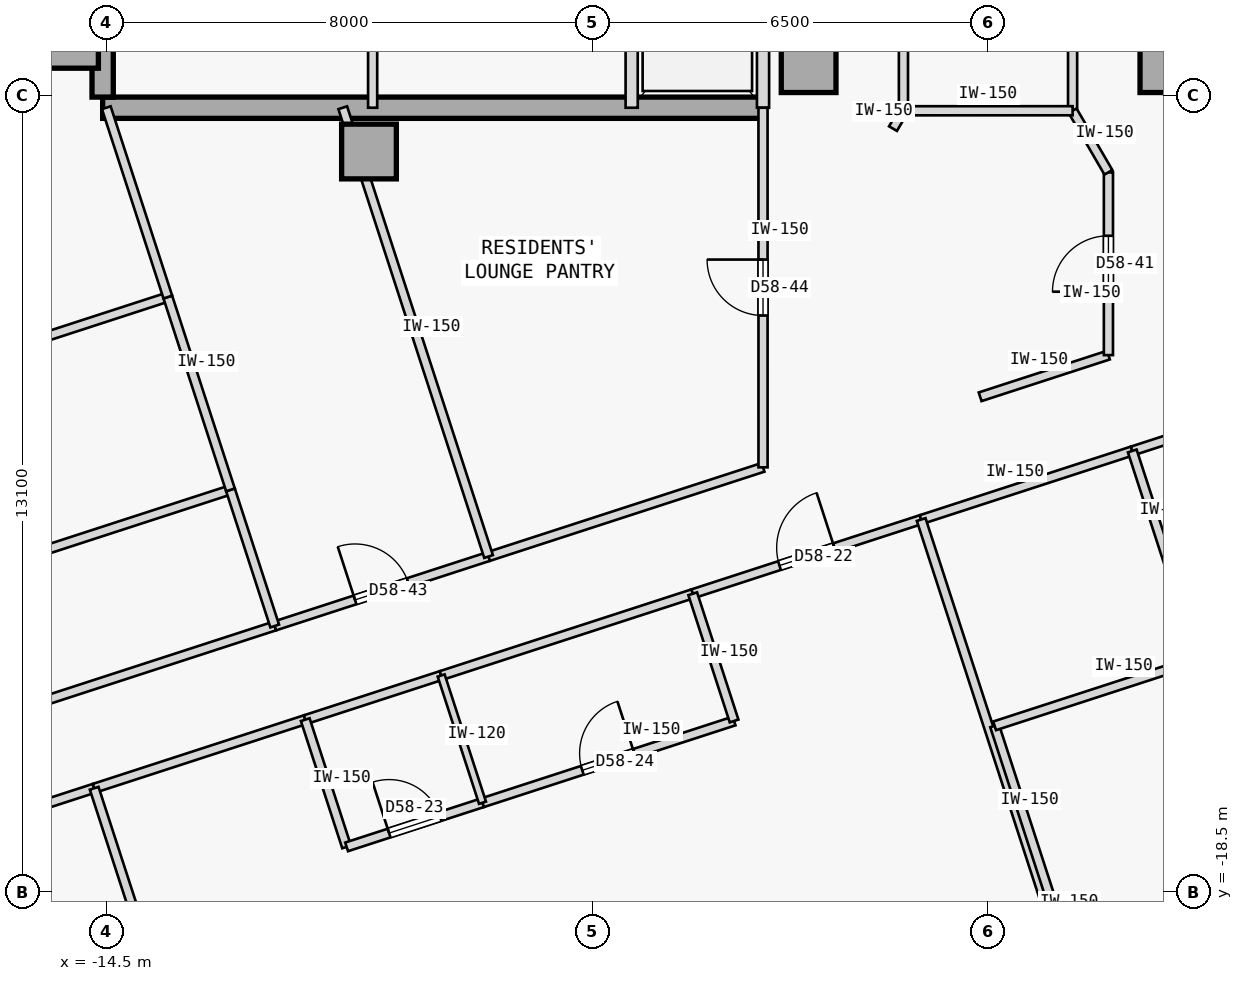
"""IFC4 building model, lengths in metres.
Left out: names, types, materials, properties, quantities, classifications, styles, units other than length and angle.
Written with IfcOpenShell. Run it as: python <this file> out.ifc"""

import sys

from ifc_helpers import new_model, si_unit, direction, frame, frame_2d, origin, origin_2d, place, context, subcontext, project, spatial, rectangle, extrude, element, fill, save


model = new_model("IFC4")
c1 = context("Model", 3, precision=1e-05, world=origin(), true_north=direction((0.0, 1.0)))
c2 = subcontext(c1, "Body", "Model", "MODEL_VIEW")
j1 = project(units=[si_unit("LENGTHUNIT", "METRE"), si_unit("PLANEANGLEUNIT", "RADIAN")], contexts=[c1])
p1 = place(None, origin())
s1 = spatial("IfcSite", under=j1, at=p1, CompositionType="ELEMENT")
p2 = place(p1, origin())
s2 = spatial("IfcBuilding", under=s1, at=p2, CompositionType="ELEMENT")
p3 = place(p2, frame((0.0, 0.0, 220.95)))
s3 = spatial("IfcBuildingStorey", under=s2, at=p3, CompositionType="ELEMENT", Elevation=220.95)
for number, where, z_axis, x_axis in (
    (1, (-15.08, -4.5, 0.0), (0.0, 0.0, 1.0), (1.0, 0.0, 0.0)),
    (2, (-10.18, -6.32, 0.0), (0.0, 0.0, 1.0), (1.0, 0.0, 0.0)),
    (3, (-2.95, -4.9, 0.0), (0.0, 0.0, 1.0), (1.0, 0.0, 0.0)),
    (4, (2.95, -4.9, 0.0), (0.0, 0.0, 1.0), (1.0, 0.0, 0.0)),
):
    element("IfcColumn", number, at=place(p3, frame(where, z_axis=z_axis, x_axis=x_axis)), inside=s3, PredefinedType="COLUMN", context=c2, shape_type="SweptSolid", body=[
        extrude(rectangle(XDim=0.9, YDim=0.9, at=origin_2d()), origin(), (0.0, 0.0, 1.0), 3.35),
    ])
p4 = place(p3, frame((-14.56, -5.6, 0.0), z_axis=(0.0, 0.0, 1.0), x_axis=(1.0, 0.0, 0.0)))
e5 = element("IfcWall", 5, at=p4, inside=s3, PredefinedType="SHEAR", context=c2, shape_type="SweptSolid", body=[
    extrude(rectangle(XDim=10.86, YDim=0.35, at=frame_2d((5.43, 0.0))), origin(), (0.0, 0.0, 1.0), 3.125),
])
p5 = place(p3, frame((-14.56, -5.425, 0.0), z_axis=(0.0, 0.0, 1.0), x_axis=(0.0, 1.0, 0.0)))
e6 = element("IfcWall", 6, at=p5, inside=s3, PredefinedType="SHEAR", context=c2, shape_type="SweptSolid", body=[
    extrude(rectangle(XDim=10.85, YDim=0.35, at=frame_2d((5.425, 0.0))), origin(), (0.0, 0.0, 1.0), 3.125),
])
for number, where, z_axis, x_axis in (
    (7, (-3.7, -5.6, 0.0), (0.0, 0.0, 1.0), (0.0, 1.0, 0.0)),
    (8, (-5.86, -5.6, 0.0), (0.0, 0.0, 1.0), (0.0, 1.0, 0.0)),
):
    element("IfcWall", number, at=place(p3, frame(where, z_axis=z_axis, x_axis=x_axis)), inside=s3, PredefinedType="STANDARD", context=c2, shape_type="SweptSolid", body=[
        extrude(rectangle(XDim=2.65, YDim=0.2, at=frame_2d((1.325, 0.0))), origin(), (0.0, 0.0, 1.0), 3.125),
    ])
p6 = place(p3, frame((-10.12, -5.6, 0.0), z_axis=(0.0, 0.0, 1.0), x_axis=(0.0, 1.0, 0.0)))
e9 = element("IfcWall", 9, at=p6, inside=s3, PredefinedType="PARTITIONING", context=c2, shape_type="SweptSolid", body=[
    extrude(rectangle(XDim=2.65, YDim=0.15, at=frame_2d((1.325, 0.0))), origin(), (0.0, 0.0, 1.0), 3.125),
])
p7 = place(p3, frame((-1.391, -5.65, 0.0), z_axis=(0.0, 0.0, 1.0), x_axis=(-8.6422954e-05, 0.999999996266, 0.0)))
e10 = element("IfcWall", 10, at=p7, inside=s3, PredefinedType="PARTITIONING", context=c2, shape_type="SweptSolid", body=[
    extrude(rectangle(XDim=11.3, YDim=0.15, at=frame_2d((5.65, 0.0))), origin(), (0.0, 0.0, 1.0), 3.125),
])
p8 = place(p7, frame((5.175, 0.0, 0.0)))
e11 = element("IfcOpeningElement", 11, at=p8, cuts=e10, PredefinedType="OPENING", context=c2, shape_type="SweptSolid", body=[
    extrude(rectangle(XDim=0.95, YDim=2.15, at=frame_2d((0.475, 1.075))), frame((0.0, 0.085, 0.0), z_axis=(0.0, -1.0, 0.0), x_axis=(1.0, 0.0, 0.0)), (0.0, 0.0, 1.0), 0.17),
])
p9 = place(p3, frame((1.391, -5.648, 0.0), z_axis=(0.0, 0.0, 1.0), x_axis=(-4.3218947e-05, 0.999999999066, 0.0)))
e12 = element("IfcWall", 12, at=p9, inside=s3, PredefinedType="PARTITIONING", context=c2, shape_type="SweptSolid", body=[
    extrude(rectangle(XDim=11.298, YDim=0.15, at=frame_2d((5.649, 0.0))), origin(), (0.0, 0.0, 1.0), 3.125),
])
p10 = place(p3, frame((-18.992, -18.186, 0.0), z_axis=(0.0, 0.0, 1.0), x_axis=(0.951067846467, 0.308982121516, 0.0)))
e13 = element("IfcWall", 13, at=p10, inside=s3, PredefinedType="PARTITIONING", context=c2, shape_type="SweptSolid", body=[
    extrude(rectangle(XDim=4.514, YDim=0.15, at=frame_2d((2.257, 0.0))), origin(), (0.0, 0.0, 1.0), 3.125),
])
p11 = place(p10, frame((1.782, 0.0, 0.0)))
e14 = element("IfcOpeningElement", 14, at=p11, cuts=e13, PredefinedType="OPENING", context=c2, shape_type="SweptSolid", body=[
    extrude(rectangle(XDim=0.95, YDim=2.15, at=frame_2d((0.475, 1.075))), frame((0.0, 0.085, 0.0), z_axis=(0.0, -1.0, 0.0), x_axis=(1.0, 0.0, 0.0)), (0.0, 0.0, 1.0), 0.17),
])
p12 = place(p3, frame((-14.699, -16.791, 0.0), z_axis=(0.0, 0.0, 1.0), x_axis=(0.951050780541, 0.309034646652, 0.0)))
e15 = element("IfcWall", 15, at=p12, inside=s3, PredefinedType="PARTITIONING", context=c2, shape_type="SweptSolid", body=[
    extrude(rectangle(XDim=3.65, YDim=0.15, at=frame_2d((1.825, 0.0))), origin(), (0.0, 0.0, 1.0), 3.125),
])
p13 = place(p3, frame((-4.856, -13.593, 0.0), z_axis=(0.0, 0.0, 1.0), x_axis=(0.951054051148, 0.309024581215, 0.0)))
e16 = element("IfcWall", 16, at=p13, inside=s3, PredefinedType="PARTITIONING", context=c2, shape_type="SweptSolid", body=[
    extrude(rectangle(XDim=3.95, YDim=0.15, at=frame_2d((1.975, 0.0))), origin(), (0.0, 0.0, 1.0), 3.125),
])
p14 = place(p13, frame((1.5, 0.0, 0.0)))
e17 = element("IfcOpeningElement", 17, at=p14, cuts=e16, PredefinedType="OPENING", context=c2, shape_type="SweptSolid", body=[
    extrude(rectangle(XDim=0.95, YDim=2.15, at=frame_2d((0.475, 1.075))), frame((0.0, 0.085, 0.0), z_axis=(0.0, -1.0, 0.0), x_axis=(1.0, 0.0, 0.0)), (0.0, 0.0, 1.0), 0.17),
])
p15 = place(p3, frame((-11.228, -15.663, 0.0), z_axis=(0.0, 0.0, 1.0), x_axis=(0.951076048914, 0.308956872689, 0.0)))
e18 = element("IfcWall", 18, at=p15, inside=s3, PredefinedType="PARTITIONING", context=c2, shape_type="SweptSolid", body=[
    extrude(rectangle(XDim=2.35, YDim=0.15, at=frame_2d((1.175, 0.0))), origin(), (0.0, 0.0, 1.0), 3.125),
])
p16 = place(p3, frame((-8.993, -14.937, 0.0), z_axis=(0.0, 0.0, 1.0), x_axis=(0.951052627573, 0.309028962374, 0.0)))
e19 = element("IfcWall", 19, at=p16, inside=s3, PredefinedType="PARTITIONING", context=c2, shape_type="SweptSolid", body=[
    extrude(rectangle(XDim=4.35, YDim=0.15, at=frame_2d((2.175, 0.0))), origin(), (0.0, 0.0, 1.0), 3.125),
])
p17 = place(p3, frame((-1.099, -12.372, 0.0), z_axis=(0.0, 0.0, 1.0), x_axis=(0.951057168147, 0.309014988174, 0.0)))
e20 = element("IfcWall", 20, at=p17, inside=s3, PredefinedType="PARTITIONING", context=c2, shape_type="SweptSolid", body=[
    extrude(rectangle(XDim=3.65, YDim=0.15, at=frame_2d((1.825, 0.0))), origin(), (0.0, 0.0, 1.0), 3.125),
])
p18 = place(p3, frame((2.372, -11.244, 0.0), z_axis=(0.0, 0.0, 1.0), x_axis=(0.951066131077, 0.308987401554, 0.0)))
e21 = element("IfcWall", 21, at=p18, inside=s3, PredefinedType="PARTITIONING", context=c2, shape_type="SweptSolid", body=[
    extrude(rectangle(XDim=2.35, YDim=0.15, at=frame_2d((1.175, 0.0))), origin(), (0.0, 0.0, 1.0), 3.125),
])
p19 = place(p3, frame((-29.45, -19.881, 0.0), z_axis=(0.0, 0.0, 1.0), x_axis=(0.95105650271, 0.309017036186, 0.0)))
e22 = element("IfcWall", 22, at=p19, inside=s3, PredefinedType="PARTITIONING", context=c2, shape_type="SweptSolid", body=[
    extrude(rectangle(XDim=18.632, YDim=0.15, at=frame_2d((9.316, 0.0))), origin(), (0.0, 0.0, 1.0), 3.125),
])
p20 = place(p19, frame((8.856, 0.0, 0.0)))
e23 = element("IfcOpeningElement", 23, at=p20, cuts=e22, PredefinedType="OPENING", context=c2, shape_type="SweptSolid", body=[
    extrude(rectangle(XDim=0.92, YDim=2.15, at=frame_2d((0.46, 1.075))), frame((0.0, 0.085, 0.0), z_axis=(0.0, -1.0, 0.0), x_axis=(1.0, 0.0, 0.0)), (0.0, 0.0, 1.0), 0.17),
])
p21 = place(p3, frame((-0.129, -10.354, 0.0), z_axis=(0.0, 0.0, 1.0), x_axis=(0.951066420845, 0.308986509643, 0.0)))
e24 = element("IfcWall", 24, at=p21, inside=s3, PredefinedType="PARTITIONING", context=c2, shape_type="SweptSolid", body=[
    extrude(rectangle(XDim=2.218, YDim=0.15, at=frame_2d((1.109, 0.0))), origin(), (0.0, 0.0, 1.0), 3.125),
])
p22 = place(p3, frame((-1.562, -5.944, 0.0), z_axis=(0.0, 0.0, 1.0), x_axis=(0.505387839696, 0.862892305845, 0.0)))
e25 = element("IfcWall", 25, at=p22, inside=s3, PredefinedType="PARTITIONING", context=c2, shape_type="SweptSolid", body=[
    extrude(rectangle(XDim=0.34, YDim=0.15, at=frame_2d((0.17, 0.0))), origin(), (0.0, 0.0, 1.0), 3.125),
])
p23 = place(p3, frame((1.98, -9.668, 0.0), z_axis=(0.0, 0.0, 1.0), x_axis=(8.1241368e-05, 0.9999999967, 0.0)))
e26 = element("IfcWall", 26, at=p23, inside=s3, PredefinedType="PARTITIONING", context=c2, shape_type="SweptSolid", body=[
    extrude(rectangle(XDim=3.005, YDim=0.15, at=frame_2d((1.502, 0.0))), origin(), (0.0, 0.0, 1.0), 3.125),
])
p24 = place(p23, frame((1.042, 0.0, 0.0)))
e27 = element("IfcOpeningElement", 27, at=p24, cuts=e26, PredefinedType="OPENING", context=c2, shape_type="SweptSolid", body=[
    extrude(rectangle(XDim=0.92, YDim=2.15, at=frame_2d((0.46, 1.075))), frame((0.0, 0.085, 0.0), z_axis=(0.0, -1.0, 0.0), x_axis=(1.0, 0.0, 0.0)), (0.0, 0.0, 1.0), 0.17),
])
p25 = place(p3, frame((1.391, -5.649, 0.0), z_axis=(0.0, 0.0, 1.0), x_axis=(0.502522642426, -0.864564048437, 0.0)))
e28 = element("IfcWall", 28, at=p25, inside=s3, PredefinedType="PARTITIONING", context=c2, shape_type="SweptSolid", body=[
    extrude(rectangle(XDim=1.171, YDim=0.15, at=frame_2d((0.586, 0.0))), origin(), (0.0, 0.0, 1.0), 3.125),
])
p26 = place(p3, frame((-11.73, -14.123, 0.0), z_axis=(0.0, 0.0, 1.0), x_axis=(0.951052502763, 0.309029346483, 0.0)))
e29 = element("IfcWall", 29, at=p26, inside=s3, PredefinedType="PARTITIONING", context=c2, shape_type="SweptSolid", body=[
    extrude(rectangle(XDim=3.698, YDim=0.15, at=frame_2d((1.849, 0.0))), origin(), (0.0, 0.0, 1.0), 3.125),
])
p27 = place(p26, frame((1.389, 0.0, 0.0)))
e30 = element("IfcOpeningElement", 30, at=p27, cuts=e29, PredefinedType="OPENING", context=c2, shape_type="SweptSolid", body=[
    extrude(rectangle(XDim=0.92, YDim=2.15, at=frame_2d((0.46, 1.075))), frame((0.0, 0.085, 0.0), z_axis=(0.0, -1.0, 0.0), x_axis=(1.0, 0.0, 0.0)), (0.0, 0.0, 1.0), 0.17),
])
p28 = place(p3, frame((-8.213, -12.98, 0.0), z_axis=(0.0, 0.0, 1.0), x_axis=(0.951058260096, 0.309011627456, 0.0)))
e31 = element("IfcWall", 31, at=p28, inside=s3, PredefinedType="PARTITIONING", context=c2, shape_type="SweptSolid", body=[
    extrude(rectangle(XDim=4.746, YDim=0.15, at=frame_2d((2.373, 0.0))), origin(), (0.0, 0.0, 1.0), 3.125),
])
p29 = place(p3, frame((-3.7, -11.514, 0.0), z_axis=(0.0, 0.0, 1.0), x_axis=(-8.2572974e-05, 0.999999996591, 0.0)))
e32 = element("IfcWall", 32, at=p29, inside=s3, PredefinedType="PARTITIONING", context=c2, shape_type="SweptSolid", body=[
    extrude(rectangle(XDim=5.913, YDim=0.15, at=frame_2d((2.957, 0.0))), origin(), (0.0, 0.0, 1.0), 3.125),
])
p30 = place(p29, frame((2.497, 0.0, 0.0)))
e33 = element("IfcOpeningElement", 33, at=p30, cuts=e32, PredefinedType="OPENING", context=c2, shape_type="SweptSolid", body=[
    extrude(rectangle(XDim=0.92, YDim=2.15, at=frame_2d((0.46, 1.075))), frame((0.0, 0.085, 0.0), z_axis=(0.0, -1.0, 0.0), x_axis=(1.0, 0.0, 0.0)), (0.0, 0.0, 1.0), 0.17),
])
p31 = place(p3, frame((-1.391, -5.65, 0.0), z_axis=(0.0, 0.0, 1.0), x_axis=(0.999999965344, 0.000263273356, 0.0)))
e34 = element("IfcWall", 34, at=p31, inside=s3, PredefinedType="PARTITIONING", context=c2, shape_type="SweptSolid", body=[
    extrude(rectangle(XDim=2.782, YDim=0.15, at=frame_2d((1.391, 0.0))), origin(), (0.0, 0.0, 1.0), 3.125),
])
p32 = place(p3, frame((-11.652, -26.17, 0.0), z_axis=(0.0, 0.0, 1.0), x_axis=(-0.308999867152, 0.951062081097, 0.0)))
e35 = element("IfcWall", 35, at=p32, inside=s3, PredefinedType="PARTITIONING", context=c2, shape_type="SweptSolid", body=[
    extrude(rectangle(XDim=9.862, YDim=0.15, at=frame_2d((4.931, 0.0))), origin(), (0.0, 0.0, 1.0), 3.125),
])
p33 = place(p3, frame((-10.548, -17.755, 0.0), z_axis=(0.0, 0.0, 1.0), x_axis=(-0.309060979314, 0.951042223598, 0.0)))
e36 = element("IfcWall", 36, at=p33, inside=s3, PredefinedType="PARTITIONING", context=c2, shape_type="SweptSolid", body=[
    extrude(rectangle(XDim=2.2, YDim=0.15, at=frame_2d((1.1, 0.0))), origin(), (0.0, 0.0, 1.0), 3.125),
])
p34 = place(p3, frame((-10.548, -17.755, 0.0), z_axis=(0.0, 0.0, 1.0), x_axis=(0.951076048914, 0.308956872689, 0.0)))
e37 = element("IfcWall", 37, at=p34, inside=s3, PredefinedType="PARTITIONING", context=c2, shape_type="SweptSolid", body=[
    extrude(rectangle(XDim=2.35, YDim=0.15, at=frame_2d((1.175, 0.0))), origin(), (0.0, 0.0, 1.0), 3.125),
])
p35 = place(p34, frame((0.735, 0.0, 0.0)))
e38 = element("IfcOpeningElement", 38, at=p35, cuts=e37, PredefinedType="OPENING", context=c2, shape_type="SweptSolid", body=[
    extrude(rectangle(XDim=0.88, YDim=2.15, at=frame_2d((0.44, 1.075))), frame((0.0, 0.085, 0.0), z_axis=(0.0, -1.0, 0.0), x_axis=(1.0, 0.0, 0.0)), (0.0, 0.0, 1.0), 0.17),
])
p36 = place(p3, frame((-8.313, -17.029, 0.0), z_axis=(0.0, 0.0, 1.0), x_axis=(0.951052627573, 0.309028962374, 0.0)))
e39 = element("IfcWall", 39, at=p36, inside=s3, PredefinedType="PARTITIONING", context=c2, shape_type="SweptSolid", body=[
    extrude(rectangle(XDim=4.35, YDim=0.15, at=frame_2d((2.175, 0.0))), origin(), (0.0, 0.0, 1.0), 3.125),
])
p37 = place(p36, frame((1.725, 0.0, 0.0)))
e40 = element("IfcOpeningElement", 40, at=p37, cuts=e39, PredefinedType="OPENING", context=c2, shape_type="SweptSolid", body=[
    extrude(rectangle(XDim=0.9, YDim=2.15, at=frame_2d((0.45, 1.075))), frame((0.0, 0.085, 0.0), z_axis=(0.0, -1.0, 0.0), x_axis=(1.0, 0.0, 0.0)), (0.0, 0.0, 1.0), 0.17),
])
p38 = place(p3, frame((-4.176, -15.685, 0.0), z_axis=(0.0, 0.0, 1.0), x_axis=(-0.309060979314, 0.951042223598, 0.0)))
e41 = element("IfcWall", 41, at=p38, inside=s3, PredefinedType="PARTITIONING", context=c2, shape_type="SweptSolid", body=[
    extrude(rectangle(XDim=2.2, YDim=0.15, at=frame_2d((1.1, 0.0))), origin(), (0.0, 0.0, 1.0), 3.125),
])
p39 = place(p3, frame((1.948, -21.751, 0.0), z_axis=(0.0, 0.0, 1.0), x_axis=(-0.308999867152, 0.951062081097, 0.0)))
e42 = element("IfcWall", 42, at=p39, inside=s3, PredefinedType="PARTITIONING", context=c2, shape_type="SweptSolid", body=[
    extrude(rectangle(XDim=9.862, YDim=0.15, at=frame_2d((4.931, 0.0))), origin(), (0.0, 0.0, 1.0), 3.125),
])
p40 = place(p3, frame((-8.313, -17.029, 0.0), z_axis=(0.0, 0.0, 1.0), x_axis=(-0.309060979314, 0.951042223598, 0.0)))
e43 = element("IfcWall", 43, at=p40, inside=s3, PredefinedType="PARTITIONING", context=c2, shape_type="SweptSolid", body=[
    extrude(rectangle(XDim=2.2, YDim=0.12, at=frame_2d((1.1, 0.0))), origin(), (0.0, 0.0, 1.0), 3.125),
])
p41 = place(p3, frame((3.052, -13.336, 0.0), z_axis=(0.0, 0.0, 1.0), x_axis=(-0.308960600764, 0.951074837842, 0.0)))
e44 = element("IfcWall", 44, at=p41, inside=s3, PredefinedType="PARTITIONING", context=c2, shape_type="SweptSolid", body=[
    extrude(rectangle(XDim=2.2, YDim=0.15, at=frame_2d((1.1, 0.0))), origin(), (0.0, 0.0, 1.0), 3.125),
])
p42 = place(p3, frame((2.043, -21.72, 0.0), z_axis=(0.0, 0.0, 1.0), x_axis=(-0.309013782848, 0.951057559777, 0.0)))
e45 = element("IfcWall", 45, at=p42, inside=s3, PredefinedType="PARTITIONING", context=c2, shape_type="SweptSolid", body=[
    extrude(rectangle(XDim=6.262, YDim=0.15, at=frame_2d((3.131, 0.0))), origin(), (0.0, 0.0, 1.0), 3.125),
])
p43 = place(p3, frame((0.108, -15.765, 0.0), z_axis=(0.0, 0.0, 1.0), x_axis=(0.951065702951, 0.308988719326, 0.0)))
e46 = element("IfcWall", 46, at=p43, inside=s3, PredefinedType="PARTITIONING", context=c2, shape_type="SweptSolid", body=[
    extrude(rectangle(XDim=4.65, YDim=0.15, at=frame_2d((2.325, 0.0))), origin(), (0.0, 0.0, 1.0), 3.125),
])
p44 = place(p3, frame((-30.178, -17.642, 0.0), z_axis=(0.0, 0.0, 1.0), x_axis=(0.95105650271, 0.309017036186, 0.0)))
e47 = element("IfcWall", 47, at=p44, inside=s3, PredefinedType="PARTITIONING", context=c2, shape_type="SweptSolid", body=[
    extrude(rectangle(XDim=18.632, YDim=0.15, at=frame_2d((9.316, 0.0))), origin(), (0.0, 0.0, 1.0), 3.125),
])
p45 = place(p44, frame((8.856, 0.0, 0.0)))
e48 = element("IfcOpeningElement", 48, at=p45, cuts=e47, PredefinedType="OPENING", context=c2, shape_type="SweptSolid", body=[
    extrude(rectangle(XDim=0.92, YDim=2.15, at=frame_2d((0.46, 1.075))), frame((0.0, 0.085, 0.0), z_axis=(0.0, -1.0, 0.0), x_axis=(1.0, 0.0, 0.0)), (0.0, 0.0, 1.0), 0.17),
])
p46 = place(p3, frame((-11.73, -14.123, 0.0), z_axis=(0.0, 0.0, 1.0), x_axis=(-0.309062621189, 0.951041690035, 0.0)))
e49 = element("IfcWall", 49, at=p46, inside=s3, PredefinedType="PARTITIONING", context=c2, shape_type="SweptSolid", body=[
    extrude(rectangle(XDim=2.354, YDim=0.15, at=frame_2d((1.177, 0.0))), origin(), (0.0, 0.0, 1.0), 3.125),
])
p47 = place(p3, frame((-31.208, -14.471, 0.0), z_axis=(0.0, 0.0, 1.0), x_axis=(0.951057753948, 0.309013185244, 0.0)))
e50 = element("IfcWall", 50, at=p47, inside=s3, PredefinedType="PARTITIONING", context=c2, shape_type="SweptSolid", body=[
    extrude(rectangle(XDim=18.632, YDim=0.15, at=frame_2d((9.316, 0.0))), origin(), (0.0, 0.0, 1.0), 3.125),
])
p48 = place(p3, frame((-12.458, -11.884, 0.0), z_axis=(0.0, 0.0, 1.0), x_axis=(-0.308946982245, 0.951079261766, 0.0)))
e51 = element("IfcWall", 51, at=p48, inside=s3, PredefinedType="PARTITIONING", context=c2, shape_type="SweptSolid", body=[
    extrude(rectangle(XDim=3.334, YDim=0.15, at=frame_2d((1.667, 0.0))), origin(), (0.0, 0.0, 1.0), 3.125),
])
p49 = place(p3, frame((-30.663, -9.757, 0.0), z_axis=(0.0, 0.0, 1.0), x_axis=(0.951058192995, 0.309011833974, 0.0)))
e52 = element("IfcWall", 52, at=p49, inside=s3, PredefinedType="PARTITIONING", context=c2, shape_type="SweptSolid", body=[
    extrude(rectangle(XDim=16.657, YDim=0.15, at=frame_2d((8.329, 0.0))), origin(), (0.0, 0.0, 1.0), 3.125),
])
p50 = place(p3, frame((-13.488, -8.713, 0.0), z_axis=(0.0, 0.0, 1.0), x_axis=(-0.309082700143, 0.951035164687, 0.0)))
e53 = element("IfcWall", 53, at=p50, inside=s3, PredefinedType="PARTITIONING", context=c2, shape_type="SweptSolid", body=[
    extrude(rectangle(XDim=3.274, YDim=0.15, at=frame_2d((1.637, 0.0))), origin(), (0.0, 0.0, 1.0), 3.125),
])
p51 = place(p3, frame((-8.213, -12.98, 0.0), z_axis=(0.0, 0.0, 1.0), x_axis=(-0.309017065592, 0.951056493155, 0.0)))
e54 = element("IfcWall", 54, at=p51, inside=s3, PredefinedType="PARTITIONING", context=c2, shape_type="SweptSolid", body=[
    extrude(rectangle(XDim=7.76, YDim=0.15, at=frame_2d((3.88, 0.0))), origin(), (0.0, 0.0, 1.0), 3.125),
])
p52 = place(p14, origin())
e55 = element("IfcDoor", 55, at=p52, inside=s3, OperationType="SINGLE_SWING_RIGHT", PredefinedType="DOOR", context=c2, shape_type="SweptSolid", body=[
    extrude(rectangle(XDim=0.95, YDim=2.15, at=frame_2d((0.475, 1.075))), frame((0.0, 0.025, 0.0), z_axis=(0.0, -1.0, 0.0), x_axis=(1.0, 0.0, 0.0)), (0.0, 0.0, 1.0), 0.05),
])
fill(e17, e55)
p53 = place(p35, origin())
e56 = element("IfcDoor", 56, at=p53, inside=s3, OperationType="SINGLE_SWING_LEFT", PredefinedType="DOOR", context=c2, shape_type="SweptSolid", body=[
    extrude(rectangle(XDim=0.88, YDim=2.15, at=frame_2d((0.44, 1.075))), frame((0.0, 0.025, 0.0), z_axis=(0.0, -1.0, 0.0), x_axis=(1.0, 0.0, 0.0)), (0.0, 0.0, 1.0), 0.05),
])
fill(e38, e56)
p54 = place(p37, origin())
e57 = element("IfcDoor", 57, at=p54, inside=s3, OperationType="SINGLE_SWING_RIGHT", PredefinedType="DOOR", context=c2, shape_type="SweptSolid", body=[
    extrude(rectangle(XDim=0.9, YDim=2.15, at=frame_2d((0.45, 1.075))), frame((0.0, 0.025, 0.0), z_axis=(0.0, -1.0, 0.0), x_axis=(1.0, 0.0, 0.0)), (0.0, 0.0, 1.0), 0.05),
])
fill(e40, e57)
p55 = place(p24, origin())
e58 = element("IfcDoor", 58, at=p55, inside=s3, OperationType="SINGLE_SWING_LEFT", PredefinedType="DOOR", context=c2, shape_type="SweptSolid", body=[
    extrude(rectangle(XDim=0.92, YDim=2.15, at=frame_2d((0.46, 1.075))), frame((0.0, 0.025, 0.0), z_axis=(0.0, -1.0, 0.0), x_axis=(1.0, 0.0, 0.0)), (0.0, 0.0, 1.0), 0.05),
])
fill(e27, e58)
p56 = place(p27, origin())
e59 = element("IfcDoor", 59, at=p56, inside=s3, OperationType="SINGLE_SWING_LEFT", PredefinedType="DOOR", context=c2, shape_type="SweptSolid", body=[
    extrude(rectangle(XDim=0.92, YDim=2.15, at=frame_2d((0.46, 1.075))), frame((0.0, 0.025, 0.0), z_axis=(0.0, -1.0, 0.0), x_axis=(1.0, 0.0, 0.0)), (0.0, 0.0, 1.0), 0.05),
])
fill(e30, e59)
p57 = place(p30, origin())
e60 = element("IfcDoor", 60, at=p57, inside=s3, OperationType="SINGLE_SWING_RIGHT", PredefinedType="DOOR", context=c2, shape_type="SweptSolid", body=[
    extrude(rectangle(XDim=0.92, YDim=2.15, at=frame_2d((0.46, 1.075))), frame((0.0, 0.025, 0.0), z_axis=(0.0, -1.0, 0.0), x_axis=(1.0, 0.0, 0.0)), (0.0, 0.0, 1.0), 0.05),
])
fill(e33, e60)
save(model, sys.argv[1])
